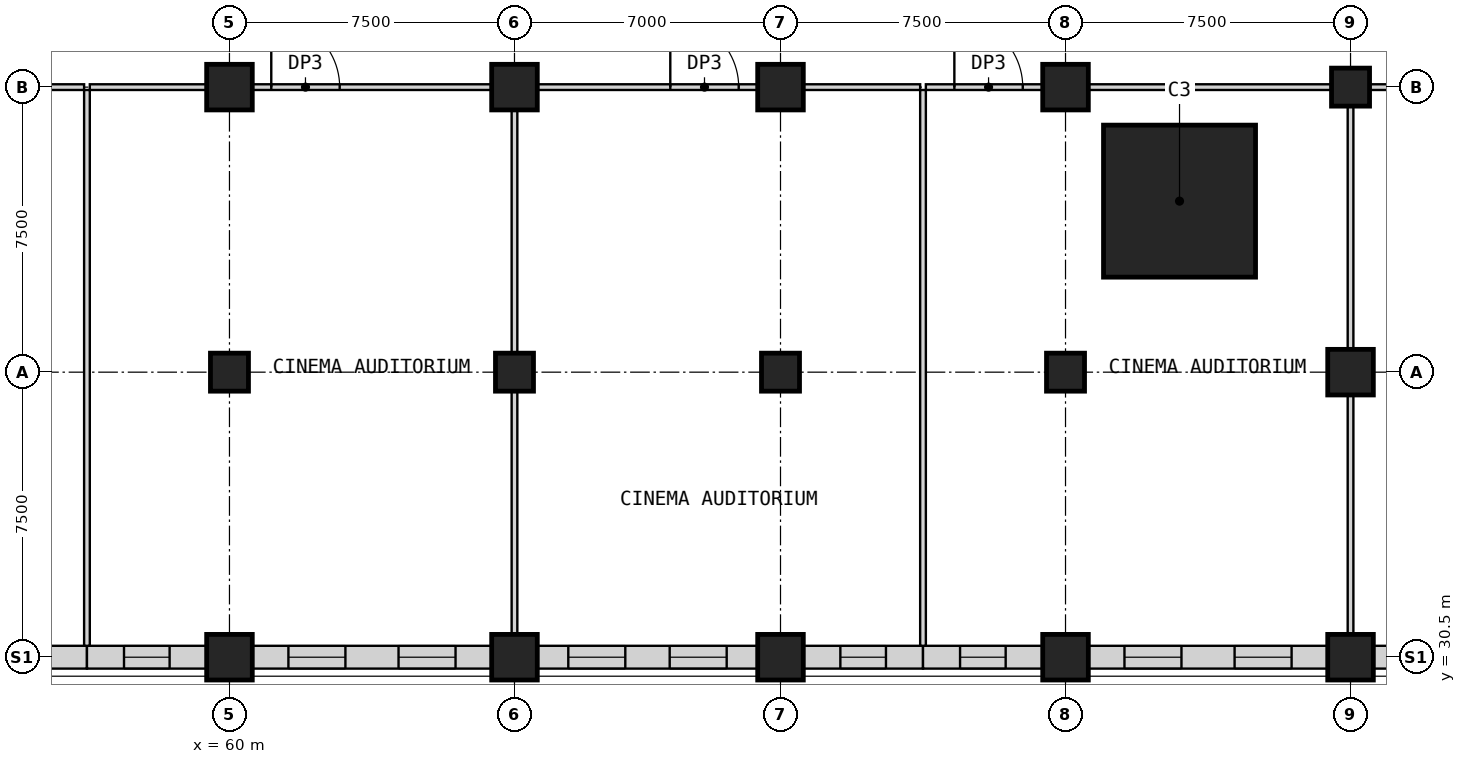
"""IFC4 building model, lengths in metres.
Left out: names, types, materials, properties, quantities, classifications, styles, units other than length and angle.
Written with IfcOpenShell. Run it as: python <this file> out.ifc"""

import sys

from ifc_helpers import new_model, si_unit, direction, frame, frame_2d, origin, origin_2d, place, context, subcontext, project, spatial, rectangle, extrude, element, fill, save


model = new_model("IFC4")
c1 = context("Model", 3, precision=1e-05, world=origin(), true_north=direction((0.0, 1.0)))
c2 = subcontext(c1, "Body", "Model", "MODEL_VIEW")
j1 = project(units=[si_unit("LENGTHUNIT", "METRE"), si_unit("PLANEANGLEUNIT", "RADIAN")], contexts=[c1])
p1 = place(None, origin())
s1 = spatial("IfcSite", under=j1, at=p1, CompositionType="ELEMENT")
p2 = place(p1, origin())
s2 = spatial("IfcBuilding", under=s1, at=p2, CompositionType="ELEMENT")
p3 = place(p2, frame((0.0, 0.0, 18.5)))
s3 = spatial("IfcBuildingStorey", under=s2, at=p3, CompositionType="ELEMENT", Elevation=18.5)
p4 = place(p3, frame((60.0, 38.0, 0.0), z_axis=(0.0, 0.0, 1.0), x_axis=(1.0, 0.0, 0.0)))
e1 = element("IfcColumn", 1, at=p4, inside=s3, PredefinedType="COLUMN", context=c2, shape_type="SweptSolid", body=[
    extrude(rectangle(XDim=1.0, YDim=1.0, at=origin_2d()), origin(), (0.0, 0.0, 1.0), 5.0),
])
p5 = place(p3, frame((60.0, 45.5, 0.0), z_axis=(0.0, 0.0, 1.0), x_axis=(1.0, 0.0, 0.0)))
e2 = element("IfcColumn", 2, at=p5, inside=s3, PredefinedType="COLUMN", context=c2, shape_type="SweptSolid", body=[
    extrude(rectangle(XDim=1.2, YDim=1.2, at=origin_2d()), origin(), (0.0, 0.0, 1.0), 5.0),
])
p6 = place(p3, frame((67.5, 38.0, 0.0), z_axis=(0.0, 0.0, 1.0), x_axis=(1.0, 0.0, 0.0)))
e3 = element("IfcColumn", 3, at=p6, inside=s3, PredefinedType="COLUMN", context=c2, shape_type="SweptSolid", body=[
    extrude(rectangle(XDim=1.0, YDim=1.0, at=origin_2d()), origin(), (0.0, 0.0, 1.0), 5.0),
])
p7 = place(p3, frame((67.5, 45.5, 0.0), z_axis=(0.0, 0.0, 1.0), x_axis=(1.0, 0.0, 0.0)))
e4 = element("IfcColumn", 4, at=p7, inside=s3, PredefinedType="COLUMN", context=c2, shape_type="SweptSolid", body=[
    extrude(rectangle(XDim=1.2, YDim=1.2, at=origin_2d()), origin(), (0.0, 0.0, 1.0), 5.0),
])
p8 = place(p3, frame((74.5, 38.0, 0.0), z_axis=(0.0, 0.0, 1.0), x_axis=(1.0, 0.0, 0.0)))
e5 = element("IfcColumn", 5, at=p8, inside=s3, PredefinedType="COLUMN", context=c2, shape_type="SweptSolid", body=[
    extrude(rectangle(XDim=1.0, YDim=1.0, at=origin_2d()), origin(), (0.0, 0.0, 1.0), 5.0),
])
p9 = place(p3, frame((74.5, 45.5, 0.0), z_axis=(0.0, 0.0, 1.0), x_axis=(1.0, 0.0, 0.0)))
e6 = element("IfcColumn", 6, at=p9, inside=s3, PredefinedType="COLUMN", context=c2, shape_type="SweptSolid", body=[
    extrude(rectangle(XDim=1.2, YDim=1.2, at=origin_2d()), origin(), (0.0, 0.0, 1.0), 5.0),
])
p10 = place(p3, frame((82.0, 38.0, 0.0), z_axis=(0.0, 0.0, 1.0), x_axis=(1.0, 0.0, 0.0)))
e7 = element("IfcColumn", 7, at=p10, inside=s3, PredefinedType="COLUMN", context=c2, shape_type="SweptSolid", body=[
    extrude(rectangle(XDim=1.0, YDim=1.0, at=origin_2d()), origin(), (0.0, 0.0, 1.0), 5.0),
])
p11 = place(p3, frame((82.0, 45.5, 0.0), z_axis=(0.0, 0.0, 1.0), x_axis=(1.0, 0.0, 0.0)))
e8 = element("IfcColumn", 8, at=p11, inside=s3, PredefinedType="COLUMN", context=c2, shape_type="SweptSolid", body=[
    extrude(rectangle(XDim=1.2, YDim=1.2, at=origin_2d()), origin(), (0.0, 0.0, 1.0), 5.0),
])
p12 = place(p3, frame((89.5, 45.5, 0.0), z_axis=(0.0, 0.0, 1.0), x_axis=(1.0, 0.0, 0.0)))
e9 = element("IfcColumn", 9, at=p12, inside=s3, PredefinedType="COLUMN", context=c2, shape_type="SweptSolid", body=[
    extrude(rectangle(XDim=1.0, YDim=1.0, at=origin_2d()), origin(), (0.0, 0.0, 1.0), 5.0),
])
p13 = place(p3, frame((85.0, 42.5, 0.0), z_axis=(0.0, 0.0, 1.0), x_axis=(1.0, 0.0, 0.0)))
e10 = element("IfcColumn", 10, at=p13, inside=s3, PredefinedType="COLUMN", context=c2, shape_type="SweptSolid", body=[
    extrude(rectangle(XDim=4.0, YDim=4.0, at=origin_2d()), origin(), (0.0, 0.0, 1.0), 5.0),
])
for number, where, z_axis, x_axis in (
    (11, (60.0, 30.5, 0.0), (0.0, 0.0, 1.0), (1.0, 0.0, 0.0)),
    (12, (67.5, 30.5, 0.0), (0.0, 0.0, 1.0), (1.0, 0.0, 0.0)),
    (13, (74.5, 30.5, 0.0), (0.0, 0.0, 1.0), (1.0, 0.0, 0.0)),
    (14, (82.0, 30.5, 0.0), (0.0, 0.0, 1.0), (1.0, 0.0, 0.0)),
    (15, (89.5, 30.5, 0.0), (0.0, 0.0, 1.0), (1.0, 0.0, 0.0)),
    (16, (89.5, 38.0, 0.0), (0.0, 0.0, 1.0), (1.0, 0.0, 0.0)),
):
    element("IfcColumn", number, at=place(p3, frame(where, z_axis=z_axis, x_axis=x_axis)), inside=s3, PredefinedType="COLUMN", context=c2, shape_type="SweptSolid", body=[
        extrude(rectangle(XDim=1.2, YDim=1.2, at=origin_2d()), origin(), (0.0, 0.0, 1.0), 5.0),
    ])
p14 = place(p3, frame((53.1, 30.5, 0.0), z_axis=(0.0, 0.0, 1.0), x_axis=(1.0, 0.0, 0.0)))
e17 = element("IfcWall", 17, at=p14, inside=s3, PredefinedType="PARTITIONING", context=c2, shape_type="SweptSolid", body=[
    extrude(rectangle(XDim=3.15, YDim=0.6, at=frame_2d((1.575, 0.0))), origin(), (0.0, 0.0, 1.0), 4.1),
])
p15 = place(p14, frame((0.975, 0.0, 0.9)))
e18 = element("IfcOpeningElement", 18, at=p15, cuts=e17, PredefinedType="OPENING", context=c2, shape_type="SweptSolid", body=[
    extrude(rectangle(XDim=1.2, YDim=2.8, at=frame_2d((0.6, 1.4))), frame((0.0, 0.31, 0.0), z_axis=(0.0, -1.0, 0.0), x_axis=(1.0, 0.0, 0.0)), (0.0, 0.0, 1.0), 0.62),
])
p16 = place(p3, frame((56.25, 30.5, 0.0), z_axis=(0.0, 0.0, 1.0), x_axis=(1.0, 0.0, 0.0)))
e19 = element("IfcWall", 19, at=p16, inside=s3, PredefinedType="PARTITIONING", context=c2, shape_type="SweptSolid", body=[
    extrude(rectangle(XDim=3.15, YDim=0.6, at=frame_2d((1.575, 0.0))), origin(), (0.0, 0.0, 1.0), 4.1),
])
p17 = place(p16, frame((0.975, 0.0, 0.9)))
e20 = element("IfcOpeningElement", 20, at=p17, cuts=e19, PredefinedType="OPENING", context=c2, shape_type="SweptSolid", body=[
    extrude(rectangle(XDim=1.2, YDim=2.8, at=frame_2d((0.6, 1.4))), frame((0.0, 0.31, 0.0), z_axis=(0.0, -1.0, 0.0), x_axis=(1.0, 0.0, 0.0)), (0.0, 0.0, 1.0), 0.62),
])
p18 = place(p3, frame((60.6, 30.5, 0.0), z_axis=(0.0, 0.0, 1.0), x_axis=(1.0, 0.0, 0.0)))
e21 = element("IfcWall", 21, at=p18, inside=s3, PredefinedType="PARTITIONING", context=c2, shape_type="SweptSolid", body=[
    extrude(rectangle(XDim=6.3, YDim=0.6, at=frame_2d((3.15, 0.0))), origin(), (0.0, 0.0, 1.0), 4.1),
])
p19 = place(p18, frame((0.951, 0.0, 0.9)))
e22 = element("IfcOpeningElement", 22, at=p19, cuts=e21, PredefinedType="OPENING", context=c2, shape_type="SweptSolid", body=[
    extrude(rectangle(XDim=1.5, YDim=2.8, at=frame_2d((0.75, 1.4))), frame((0.0, 0.31, 0.0), z_axis=(0.0, -1.0, 0.0), x_axis=(1.0, 0.0, 0.0)), (0.0, 0.0, 1.0), 0.62),
])
p20 = place(p18, frame((3.849, 0.0, 0.9)))
e23 = element("IfcOpeningElement", 23, at=p20, cuts=e21, PredefinedType="OPENING", context=c2, shape_type="SweptSolid", body=[
    extrude(rectangle(XDim=1.5, YDim=2.8, at=frame_2d((0.75, 1.4))), frame((0.0, 0.31, 0.0), z_axis=(0.0, -1.0, 0.0), x_axis=(1.0, 0.0, 0.0)), (0.0, 0.0, 1.0), 0.62),
])
p21 = place(p3, frame((68.1, 30.5, 0.0), z_axis=(0.0, 0.0, 1.0), x_axis=(1.0, 0.0, 0.0)))
e24 = element("IfcWall", 24, at=p21, inside=s3, PredefinedType="PARTITIONING", context=c2, shape_type="SweptSolid", body=[
    extrude(rectangle(XDim=5.8, YDim=0.6, at=frame_2d((2.9, 0.0))), origin(), (0.0, 0.0, 1.0), 4.1),
])
p22 = place(p21, frame((0.816, 0.0, 0.9)))
e25 = element("IfcOpeningElement", 25, at=p22, cuts=e24, PredefinedType="OPENING", context=c2, shape_type="SweptSolid", body=[
    extrude(rectangle(XDim=1.5, YDim=2.8, at=frame_2d((0.75, 1.4))), frame((0.0, 0.31, 0.0), z_axis=(0.0, -1.0, 0.0), x_axis=(1.0, 0.0, 0.0)), (0.0, 0.0, 1.0), 0.62),
])
p23 = place(p21, frame((3.484, 0.0, 0.9)))
e26 = element("IfcOpeningElement", 26, at=p23, cuts=e24, PredefinedType="OPENING", context=c2, shape_type="SweptSolid", body=[
    extrude(rectangle(XDim=1.5, YDim=2.8, at=frame_2d((0.75, 1.4))), frame((0.0, 0.31, 0.0), z_axis=(0.0, -1.0, 0.0), x_axis=(1.0, 0.0, 0.0)), (0.0, 0.0, 1.0), 0.62),
])
p24 = place(p3, frame((75.1, 30.5, 0.0), z_axis=(0.0, 0.0, 1.0), x_axis=(1.0, 0.0, 0.0)))
e27 = element("IfcWall", 27, at=p24, inside=s3, PredefinedType="PARTITIONING", context=c2, shape_type="SweptSolid", body=[
    extrude(rectangle(XDim=3.15, YDim=0.6, at=frame_2d((1.575, 0.0))), origin(), (0.0, 0.0, 1.0), 4.1),
])
p25 = place(p24, frame((0.975, 0.0, 0.9)))
e28 = element("IfcOpeningElement", 28, at=p25, cuts=e27, PredefinedType="OPENING", context=c2, shape_type="SweptSolid", body=[
    extrude(rectangle(XDim=1.2, YDim=2.8, at=frame_2d((0.6, 1.4))), frame((0.0, 0.31, 0.0), z_axis=(0.0, -1.0, 0.0), x_axis=(1.0, 0.0, 0.0)), (0.0, 0.0, 1.0), 0.62),
])
p26 = place(p3, frame((78.25, 30.5, 0.0), z_axis=(0.0, 0.0, 1.0), x_axis=(1.0, 0.0, 0.0)))
e29 = element("IfcWall", 29, at=p26, inside=s3, PredefinedType="PARTITIONING", context=c2, shape_type="SweptSolid", body=[
    extrude(rectangle(XDim=3.15, YDim=0.6, at=frame_2d((1.575, 0.0))), origin(), (0.0, 0.0, 1.0), 4.1),
])
p27 = place(p26, frame((0.975, 0.0, 0.9)))
e30 = element("IfcOpeningElement", 30, at=p27, cuts=e29, PredefinedType="OPENING", context=c2, shape_type="SweptSolid", body=[
    extrude(rectangle(XDim=1.2, YDim=2.8, at=frame_2d((0.6, 1.4))), frame((0.0, 0.31, 0.0), z_axis=(0.0, -1.0, 0.0), x_axis=(1.0, 0.0, 0.0)), (0.0, 0.0, 1.0), 0.62),
])
p28 = place(p3, frame((82.6, 30.5, 0.0), z_axis=(0.0, 0.0, 1.0), x_axis=(1.0, 0.0, 0.0)))
e31 = element("IfcWall", 31, at=p28, inside=s3, PredefinedType="PARTITIONING", context=c2, shape_type="SweptSolid", body=[
    extrude(rectangle(XDim=6.3, YDim=0.6, at=frame_2d((3.15, 0.0))), origin(), (0.0, 0.0, 1.0), 4.1),
])
p29 = place(p28, frame((0.951, 0.0, 0.9)))
e32 = element("IfcOpeningElement", 32, at=p29, cuts=e31, PredefinedType="OPENING", context=c2, shape_type="SweptSolid", body=[
    extrude(rectangle(XDim=1.5, YDim=2.8, at=frame_2d((0.75, 1.4))), frame((0.0, 0.31, 0.0), z_axis=(0.0, -1.0, 0.0), x_axis=(1.0, 0.0, 0.0)), (0.0, 0.0, 1.0), 0.62),
])
p30 = place(p28, frame((3.849, 0.0, 0.9)))
e33 = element("IfcOpeningElement", 33, at=p30, cuts=e31, PredefinedType="OPENING", context=c2, shape_type="SweptSolid", body=[
    extrude(rectangle(XDim=1.5, YDim=2.8, at=frame_2d((0.75, 1.4))), frame((0.0, 0.31, 0.0), z_axis=(0.0, -1.0, 0.0), x_axis=(1.0, 0.0, 0.0)), (0.0, 0.0, 1.0), 0.62),
])
p31 = place(p3, frame((90.1, 30.5, 0.0), z_axis=(0.0, 0.0, 1.0), x_axis=(1.0, 0.0, 0.0)))
e34 = element("IfcWall", 34, at=p31, inside=s3, PredefinedType="PARTITIONING", context=c2, shape_type="SweptSolid", body=[
    extrude(rectangle(XDim=6.3, YDim=0.6, at=frame_2d((3.15, 0.0))), origin(), (0.0, 0.0, 1.0), 4.1),
])
p32 = place(p31, frame((0.951, 0.0, 0.9)))
e35 = element("IfcOpeningElement", 35, at=p32, cuts=e34, PredefinedType="OPENING", context=c2, shape_type="SweptSolid", body=[
    extrude(rectangle(XDim=1.5, YDim=2.8, at=frame_2d((0.75, 1.4))), frame((0.0, 0.31, 0.0), z_axis=(0.0, -1.0, 0.0), x_axis=(1.0, 0.0, 0.0)), (0.0, 0.0, 1.0), 0.62),
])
p33 = place(p31, frame((3.849, 0.0, 0.9)))
e36 = element("IfcOpeningElement", 36, at=p33, cuts=e34, PredefinedType="OPENING", context=c2, shape_type="SweptSolid", body=[
    extrude(rectangle(XDim=1.5, YDim=2.8, at=frame_2d((0.75, 1.4))), frame((0.0, 0.31, 0.0), z_axis=(0.0, -1.0, 0.0), x_axis=(1.0, 0.0, 0.0)), (0.0, 0.0, 1.0), 0.62),
])
for number, where, z_axis, x_axis in (
    (37, (53.1, 45.5, 0.0), (0.0, 0.0, 1.0), (1.0, 0.0, 0.0)),
    (38, (56.325, 45.5, 0.0), (0.0, 0.0, 1.0), (1.0, 0.0, 0.0)),
):
    element("IfcWall", number, at=place(p3, frame(where, z_axis=z_axis, x_axis=x_axis)), inside=s3, PredefinedType="PARTITIONING", context=c2, shape_type="SweptSolid", body=[
        extrude(rectangle(XDim=3.075, YDim=0.15, at=frame_2d((1.538, 0.0))), origin(), (0.0, 0.0, 1.0), 4.7),
    ])
p34 = place(p3, frame((60.6, 45.5, 0.0), z_axis=(0.0, 0.0, 1.0), x_axis=(1.0, 0.0, 0.0)))
e39 = element("IfcWall", 39, at=p34, inside=s3, PredefinedType="PARTITIONING", context=c2, shape_type="SweptSolid", body=[
    extrude(rectangle(XDim=6.3, YDim=0.15, at=frame_2d((3.15, 0.0))), origin(), (0.0, 0.0, 1.0), 4.7),
])
p35 = place(p34, frame((0.5, 0.0, 0.0)))
e40 = element("IfcOpeningElement", 40, at=p35, cuts=e39, PredefinedType="OPENING", context=c2, shape_type="SweptSolid", body=[
    extrude(rectangle(XDim=1.8, YDim=2.4, at=frame_2d((0.9, 1.2))), frame((0.0, 0.085, 0.0), z_axis=(0.0, -1.0, 0.0), x_axis=(1.0, 0.0, 0.0)), (0.0, 0.0, 1.0), 0.17),
])
p36 = place(p3, frame((68.1, 45.5, 0.0), z_axis=(0.0, 0.0, 1.0), x_axis=(1.0, 0.0, 0.0)))
e41 = element("IfcWall", 41, at=p36, inside=s3, PredefinedType="PARTITIONING", context=c2, shape_type="SweptSolid", body=[
    extrude(rectangle(XDim=5.8, YDim=0.15, at=frame_2d((2.9, 0.0))), origin(), (0.0, 0.0, 1.0), 4.7),
])
p37 = place(p36, frame((3.5, 0.0, 0.0)))
e42 = element("IfcOpeningElement", 42, at=p37, cuts=e41, PredefinedType="OPENING", context=c2, shape_type="SweptSolid", body=[
    extrude(rectangle(XDim=1.8, YDim=2.4, at=frame_2d((0.9, 1.2))), frame((0.0, 0.085, 0.0), z_axis=(0.0, -1.0, 0.0), x_axis=(1.0, 0.0, 0.0)), (0.0, 0.0, 1.0), 0.17),
])
p38 = place(p3, frame((75.1, 45.5, 0.0), z_axis=(0.0, 0.0, 1.0), x_axis=(1.0, 0.0, 0.0)))
e43 = element("IfcWall", 43, at=p38, inside=s3, PredefinedType="PARTITIONING", context=c2, shape_type="SweptSolid", body=[
    extrude(rectangle(XDim=3.075, YDim=0.15, at=frame_2d((1.538, 0.0))), origin(), (0.0, 0.0, 1.0), 4.7),
])
p39 = place(p3, frame((78.325, 45.5, 0.0), z_axis=(0.0, 0.0, 1.0), x_axis=(1.0, 0.0, 0.0)))
e44 = element("IfcWall", 44, at=p39, inside=s3, PredefinedType="PARTITIONING", context=c2, shape_type="SweptSolid", body=[
    extrude(rectangle(XDim=3.075, YDim=0.15, at=frame_2d((1.538, 0.0))), origin(), (0.0, 0.0, 1.0), 4.7),
])
p40 = place(p39, frame((0.75, 0.0, 0.0)))
e45 = element("IfcOpeningElement", 45, at=p40, cuts=e44, PredefinedType="OPENING", context=c2, shape_type="SweptSolid", body=[
    extrude(rectangle(XDim=1.8, YDim=2.4, at=frame_2d((0.9, 1.2))), frame((0.0, 0.085, 0.0), z_axis=(0.0, -1.0, 0.0), x_axis=(1.0, 0.0, 0.0)), (0.0, 0.0, 1.0), 0.17),
])
for number, where, z_axis, x_axis in (
    (46, (82.6, 45.5, 0.0), (0.0, 0.0, 1.0), (1.0, 0.0, 0.0)),
    (47, (90.0, 45.5, 0.0), (0.0, 0.0, 1.0), (1.0, 0.0, 0.0)),
):
    element("IfcWall", number, at=place(p3, frame(where, z_axis=z_axis, x_axis=x_axis)), inside=s3, PredefinedType="PARTITIONING", context=c2, shape_type="SweptSolid", body=[
        extrude(rectangle(XDim=6.4, YDim=0.15, at=frame_2d((3.2, 0.0))), origin(), (0.0, 0.0, 1.0), 4.7),
    ])
p41 = place(p3, frame((56.25, 30.8, 0.0), z_axis=(0.0, 0.0, 1.0), x_axis=(0.0, 1.0, 0.0)))
e48 = element("IfcWall", 48, at=p41, inside=s3, PredefinedType="PARTITIONING", context=c2, shape_type="SweptSolid", body=[
    extrude(rectangle(XDim=14.625, YDim=0.15, at=frame_2d((7.312, 0.0))), origin(), (0.0, 0.0, 1.0), 4.7),
])
for number, where, z_axis, x_axis in (
    (49, (67.5, 31.1, 0.0), (0.0, 0.0, 1.0), (0.0, 1.0, 0.0)),
    (50, (67.5, 38.5, 0.0), (0.0, 0.0, 1.0), (0.0, 1.0, 0.0)),
):
    element("IfcWall", number, at=place(p3, frame(where, z_axis=z_axis, x_axis=x_axis)), inside=s3, PredefinedType="PARTITIONING", context=c2, shape_type="SweptSolid", body=[
        extrude(rectangle(XDim=6.4, YDim=0.15, at=frame_2d((3.2, 0.0))), origin(), (0.0, 0.0, 1.0), 4.7),
    ])
p42 = place(p3, frame((78.25, 30.8, 0.0), z_axis=(0.0, 0.0, 1.0), x_axis=(0.0, 1.0, 0.0)))
e51 = element("IfcWall", 51, at=p42, inside=s3, PredefinedType="PARTITIONING", context=c2, shape_type="SweptSolid", body=[
    extrude(rectangle(XDim=14.625, YDim=0.15, at=frame_2d((7.312, 0.0))), origin(), (0.0, 0.0, 1.0), 4.7),
])
p43 = place(p3, frame((89.5, 31.1, 0.0), z_axis=(0.0, 0.0, 1.0), x_axis=(0.0, 1.0, 0.0)))
e52 = element("IfcWall", 52, at=p43, inside=s3, PredefinedType="PARTITIONING", context=c2, shape_type="SweptSolid", body=[
    extrude(rectangle(XDim=6.3, YDim=0.15, at=frame_2d((3.15, 0.0))), origin(), (0.0, 0.0, 1.0), 4.7),
])
p44 = place(p3, frame((89.5, 38.6, 0.0), z_axis=(0.0, 0.0, 1.0), x_axis=(0.0, 1.0, 0.0)))
e53 = element("IfcWall", 53, at=p44, inside=s3, PredefinedType="PARTITIONING", context=c2, shape_type="SweptSolid", body=[
    extrude(rectangle(XDim=6.4, YDim=0.15, at=frame_2d((3.2, 0.0))), origin(), (0.0, 0.0, 1.0), 4.7),
])
p45 = place(p17, origin())
e54 = element("IfcWindow", 54, at=p45, inside=s3, PartitioningType="SINGLE_PANEL", PredefinedType="WINDOW", context=c2, shape_type="SweptSolid", body=[
    extrude(rectangle(XDim=1.2, YDim=2.8, at=frame_2d((0.6, 1.4))), frame((0.0, 0.03, 0.0), z_axis=(0.0, -1.0, 0.0), x_axis=(1.0, 0.0, 0.0)), (0.0, 0.0, 1.0), 0.06),
])
fill(e20, e54)
p46 = place(p19, origin())
e55 = element("IfcWindow", 55, at=p46, inside=s3, PartitioningType="SINGLE_PANEL", PredefinedType="WINDOW", context=c2, shape_type="SweptSolid", body=[
    extrude(rectangle(XDim=1.5, YDim=2.8, at=frame_2d((0.75, 1.4))), frame((0.0, 0.03, 0.0), z_axis=(0.0, -1.0, 0.0), x_axis=(1.0, 0.0, 0.0)), (0.0, 0.0, 1.0), 0.06),
])
fill(e22, e55)
p47 = place(p20, origin())
e56 = element("IfcWindow", 56, at=p47, inside=s3, PartitioningType="SINGLE_PANEL", PredefinedType="WINDOW", context=c2, shape_type="SweptSolid", body=[
    extrude(rectangle(XDim=1.5, YDim=2.8, at=frame_2d((0.75, 1.4))), frame((0.0, 0.03, 0.0), z_axis=(0.0, -1.0, 0.0), x_axis=(1.0, 0.0, 0.0)), (0.0, 0.0, 1.0), 0.06),
])
fill(e23, e56)
p48 = place(p22, origin())
e57 = element("IfcWindow", 57, at=p48, inside=s3, PartitioningType="SINGLE_PANEL", PredefinedType="WINDOW", context=c2, shape_type="SweptSolid", body=[
    extrude(rectangle(XDim=1.5, YDim=2.8, at=frame_2d((0.75, 1.4))), frame((0.0, 0.03, 0.0), z_axis=(0.0, -1.0, 0.0), x_axis=(1.0, 0.0, 0.0)), (0.0, 0.0, 1.0), 0.06),
])
fill(e25, e57)
p49 = place(p23, origin())
e58 = element("IfcWindow", 58, at=p49, inside=s3, PartitioningType="SINGLE_PANEL", PredefinedType="WINDOW", context=c2, shape_type="SweptSolid", body=[
    extrude(rectangle(XDim=1.5, YDim=2.8, at=frame_2d((0.75, 1.4))), frame((0.0, 0.03, 0.0), z_axis=(0.0, -1.0, 0.0), x_axis=(1.0, 0.0, 0.0)), (0.0, 0.0, 1.0), 0.06),
])
fill(e26, e58)
p50 = place(p25, origin())
e59 = element("IfcWindow", 59, at=p50, inside=s3, PartitioningType="SINGLE_PANEL", PredefinedType="WINDOW", context=c2, shape_type="SweptSolid", body=[
    extrude(rectangle(XDim=1.2, YDim=2.8, at=frame_2d((0.6, 1.4))), frame((0.0, 0.03, 0.0), z_axis=(0.0, -1.0, 0.0), x_axis=(1.0, 0.0, 0.0)), (0.0, 0.0, 1.0), 0.06),
])
fill(e28, e59)
p51 = place(p27, origin())
e60 = element("IfcWindow", 60, at=p51, inside=s3, PartitioningType="SINGLE_PANEL", PredefinedType="WINDOW", context=c2, shape_type="SweptSolid", body=[
    extrude(rectangle(XDim=1.2, YDim=2.8, at=frame_2d((0.6, 1.4))), frame((0.0, 0.03, 0.0), z_axis=(0.0, -1.0, 0.0), x_axis=(1.0, 0.0, 0.0)), (0.0, 0.0, 1.0), 0.06),
])
fill(e30, e60)
p52 = place(p29, origin())
e61 = element("IfcWindow", 61, at=p52, inside=s3, PartitioningType="SINGLE_PANEL", PredefinedType="WINDOW", context=c2, shape_type="SweptSolid", body=[
    extrude(rectangle(XDim=1.5, YDim=2.8, at=frame_2d((0.75, 1.4))), frame((0.0, 0.03, 0.0), z_axis=(0.0, -1.0, 0.0), x_axis=(1.0, 0.0, 0.0)), (0.0, 0.0, 1.0), 0.06),
])
fill(e32, e61)
p53 = place(p30, origin())
e62 = element("IfcWindow", 62, at=p53, inside=s3, PartitioningType="SINGLE_PANEL", PredefinedType="WINDOW", context=c2, shape_type="SweptSolid", body=[
    extrude(rectangle(XDim=1.5, YDim=2.8, at=frame_2d((0.75, 1.4))), frame((0.0, 0.03, 0.0), z_axis=(0.0, -1.0, 0.0), x_axis=(1.0, 0.0, 0.0)), (0.0, 0.0, 1.0), 0.06),
])
fill(e33, e62)
p54 = place(p35, origin())
e63 = element("IfcDoor", 63, at=p54, inside=s3, OperationType="SINGLE_SWING_LEFT", PredefinedType="DOOR", context=c2, shape_type="SweptSolid", body=[
    extrude(rectangle(XDim=1.8, YDim=2.4, at=frame_2d((0.9, 1.2))), frame((0.0, 0.025, 0.0), z_axis=(0.0, -1.0, 0.0), x_axis=(1.0, 0.0, 0.0)), (0.0, 0.0, 1.0), 0.05),
])
fill(e40, e63)
p55 = place(p37, origin())
e64 = element("IfcDoor", 64, at=p55, inside=s3, OperationType="SINGLE_SWING_LEFT", PredefinedType="DOOR", context=c2, shape_type="SweptSolid", body=[
    extrude(rectangle(XDim=1.8, YDim=2.4, at=frame_2d((0.9, 1.2))), frame((0.0, 0.025, 0.0), z_axis=(0.0, -1.0, 0.0), x_axis=(1.0, 0.0, 0.0)), (0.0, 0.0, 1.0), 0.05),
])
fill(e42, e64)
p56 = place(p40, origin())
e65 = element("IfcDoor", 65, at=p56, inside=s3, OperationType="SINGLE_SWING_LEFT", PredefinedType="DOOR", context=c2, shape_type="SweptSolid", body=[
    extrude(rectangle(XDim=1.8, YDim=2.4, at=frame_2d((0.9, 1.2))), frame((0.0, 0.025, 0.0), z_axis=(0.0, -1.0, 0.0), x_axis=(1.0, 0.0, 0.0)), (0.0, 0.0, 1.0), 0.05),
])
fill(e45, e65)
save(model, sys.argv[1])
